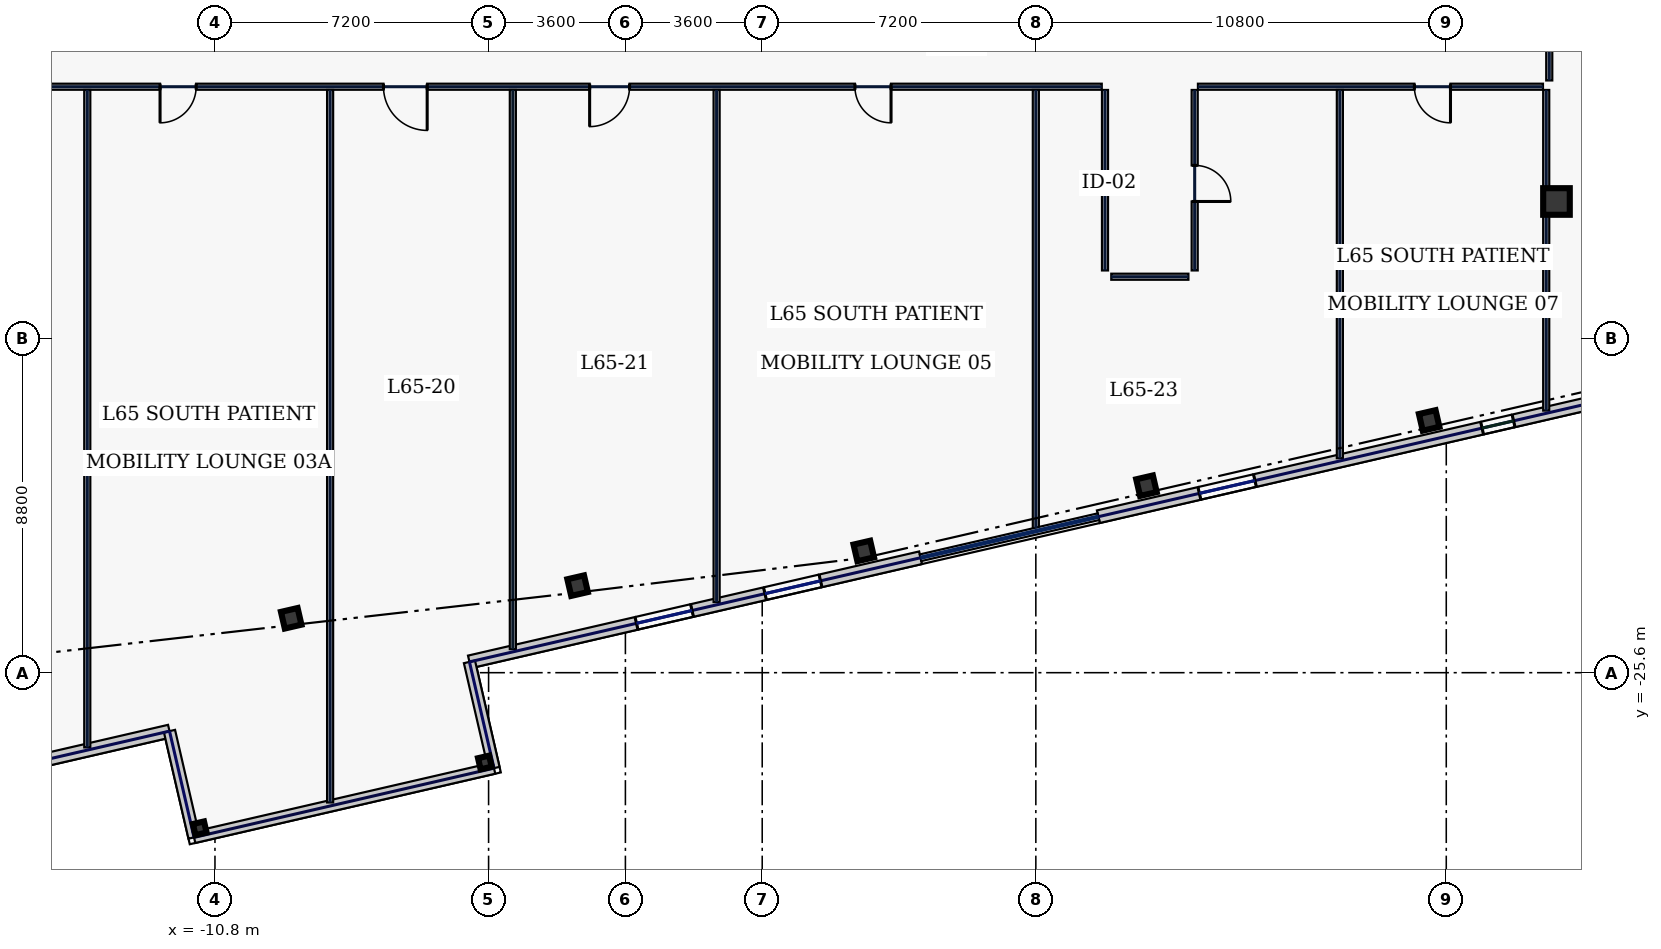
"""IFC4 building model, lengths in metres.
Left out: names, types, materials, properties, quantities, classifications, styles, units other than length and angle.
Written with IfcOpenShell. Run it as: python <this file> out.ifc"""

import sys

from ifc_helpers import new_model, si_unit, direction, frame, frame_2d, origin, origin_2d, place, context, subcontext, project, spatial, rectangle, hollow_rectangle, extrude, element, fill, save


model = new_model("IFC4")
c1 = context("Model", 3, precision=1e-05, world=origin(), true_north=direction((0.0, 1.0)))
c2 = subcontext(c1, "Body", "Model", "MODEL_VIEW")
j1 = project(units=[si_unit("LENGTHUNIT", "METRE"), si_unit("PLANEANGLEUNIT", "RADIAN")], contexts=[c1])
p1 = place(None, origin())
s1 = spatial("IfcSite", under=j1, at=p1, CompositionType="ELEMENT")
p2 = place(p1, origin())
s2 = spatial("IfcBuilding", under=s1, at=p2, CompositionType="ELEMENT")
p3 = place(p2, frame((0.0, 0.0, 281.0)))
s3 = spatial("IfcBuildingStorey", under=s2, at=p3, CompositionType="ELEMENT", Elevation=281.0)
p4 = place(p3, frame((24.5, -13.2, 0.0), z_axis=(0.0, 0.0, 1.0), x_axis=(1.0, 0.0, 0.0)))
e1 = element("IfcColumn", 1, at=p4, inside=s3, PredefinedType="COLUMN", context=c2, shape_type="SweptSolid", body=[
    extrude(hollow_rectangle(XDim=0.7, YDim=0.7, WallThickness=0.032, at=origin_2d()), origin(), (0.0, 0.0, 1.0), 3.74),
])
for number, where, z_axis, x_axis in (
    (2, (-8.794, -24.168, 0.0), (0.0, 0.0, 1.0), (0.974, 0.225, 0.0)),
    (3, (-1.258, -23.31, 0.0), (0.0, 0.0, 1.0), (0.974, 0.225, 0.0)),
    (4, (6.273, -22.397, 0.0), (0.0, 0.0, 1.0), (0.974, 0.225, 0.0)),
    (5, (13.711, -20.68, 0.0), (0.0, 0.0, 1.0), (0.974, 0.225, 0.0)),
    (6, (21.15, -18.962, 0.0), (0.0, 0.0, 1.0), (0.974, 0.225, 0.0)),
):
    element("IfcColumn", number, at=place(p3, frame(where, z_axis=z_axis, x_axis=x_axis)), inside=s3, PredefinedType="COLUMN", context=c2, shape_type="SweptSolid", body=[
        extrude(hollow_rectangle(XDim=0.45, YDim=0.45, WallThickness=0.022, at=origin_2d()), origin(), (0.0, 0.0, 1.0), 3.74),
    ])
for number, where, z_axis, x_axis in (
    (7, (-11.201, -29.695, 0.0), (0.0, 0.0, 1.0), (0.974, 0.225, 0.0)),
    (8, (-3.698, -27.963, 0.0), (0.0, 0.0, 1.0), (0.974, 0.225, 0.0)),
):
    element("IfcColumn", number, at=place(p3, frame(where, z_axis=z_axis, x_axis=x_axis)), inside=s3, PredefinedType="COLUMN", context=c2, shape_type="SweptSolid", body=[
        extrude(hollow_rectangle(XDim=0.3, YDim=0.3, WallThickness=0.016, at=origin_2d()), origin(), (0.0, 0.0, 1.0), 3.74),
    ])
p5 = place(p3, frame((-24.03, -29.916, 0.0), z_axis=(0.0, 0.0, 1.0), x_axis=(0.974371201193, 0.224946131964, 0.0)))
e9 = element("IfcWall", 9, at=p5, inside=s3, PredefinedType="STANDARD", context=c2, shape_type="SweptSolid", body=[
    extrude(rectangle(XDim=12.35, YDim=0.34, at=frame_2d((6.175, 0.0))), origin(), (0.0, 0.0, 1.0), 3.74),
])
p6 = place(p5, frame((2.35, 0.0, 0.9)))
e10 = element("IfcOpeningElement", 10, at=p6, cuts=e9, PredefinedType="OPENING", context=c2, shape_type="SweptSolid", body=[
    extrude(rectangle(XDim=1.5, YDim=2.0, at=frame_2d((0.75, 1.0))), frame((0.0, 0.18, 0.0), z_axis=(0.0, -1.0, 0.0), x_axis=(1.0, 0.0, 0.0)), (0.0, 0.0, 1.0), 0.36),
])
p7 = place(p5, frame((5.817, 0.0, 0.9)))
e11 = element("IfcOpeningElement", 11, at=p7, cuts=e9, PredefinedType="OPENING", context=c2, shape_type="SweptSolid", body=[
    extrude(rectangle(XDim=1.5, YDim=2.0, at=frame_2d((0.75, 1.0))), frame((0.0, 0.18, 0.0), z_axis=(0.0, -1.0, 0.0), x_axis=(1.0, 0.0, 0.0)), (0.0, 0.0, 1.0), 0.36),
])
p8 = place(p3, frame((-4.104, -25.316, 0.0), z_axis=(0.0, 0.0, 1.0), x_axis=(0.974372956312, 0.224938529398, 0.0)))
e12 = element("IfcWall", 12, at=p8, inside=s3, PredefinedType="STANDARD", context=c2, shape_type="SweptSolid", body=[
    extrude(rectangle(XDim=12.184, YDim=0.34, at=frame_2d((6.092, 0.0))), origin(), (0.0, 0.0, 1.0), 3.74),
])
p9 = place(p8, frame((4.511, 0.0, 0.9)))
e13 = element("IfcOpeningElement", 13, at=p9, cuts=e12, PredefinedType="OPENING", context=c2, shape_type="SweptSolid", body=[
    extrude(rectangle(XDim=1.5, YDim=2.0, at=frame_2d((0.75, 1.0))), frame((0.0, 0.18, 0.0), z_axis=(0.0, -1.0, 0.0), x_axis=(1.0, 0.0, 0.0)), (0.0, 0.0, 1.0), 0.36),
])
p10 = place(p8, frame((7.981, 0.0, 0.9)))
e14 = element("IfcOpeningElement", 14, at=p10, cuts=e12, PredefinedType="OPENING", context=c2, shape_type="SweptSolid", body=[
    extrude(rectangle(XDim=1.5, YDim=2.0, at=frame_2d((0.75, 1.0))), frame((0.0, 0.18, 0.0), z_axis=(0.0, -1.0, 0.0), x_axis=(1.0, 0.0, 0.0)), (0.0, 0.0, 1.0), 0.36),
])
p11 = place(p3, frame((12.445, -21.495, 0.0), z_axis=(0.0, 0.0, 1.0), x_axis=(0.974369392164, 0.224953967767, 0.0)))
e15 = element("IfcWall", 15, at=p11, inside=s3, PredefinedType="STANDARD", context=c2, shape_type="SweptSolid", body=[
    extrude(rectangle(XDim=17.366, YDim=0.34, at=frame_2d((8.683, 0.0))), origin(), (0.0, 0.0, 1.0), 3.74),
])
p12 = place(p11, frame((2.729, 0.0, 0.9)))
e16 = element("IfcOpeningElement", 16, at=p12, cuts=e15, PredefinedType="OPENING", context=c2, shape_type="SweptSolid", body=[
    extrude(rectangle(XDim=1.5, YDim=2.0, at=frame_2d((0.75, 1.0))), frame((0.0, 0.18, 0.0), z_axis=(0.0, -1.0, 0.0), x_axis=(1.0, 0.0, 0.0)), (0.0, 0.0, 1.0), 0.36),
])
p13 = place(p11, frame((10.363, 0.0, 0.9)))
e17 = element("IfcOpeningElement", 17, at=p13, cuts=e15, PredefinedType="OPENING", context=c2, shape_type="SweptSolid", body=[
    extrude(rectangle(XDim=0.85, YDim=1.85, at=frame_2d((0.425, 0.925))), frame((0.0, 0.18, 0.0), z_axis=(0.0, -1.0, 0.0), x_axis=(1.0, 0.0, 0.0)), (0.0, 0.0, 1.0), 0.36),
])
p14 = place(p11, frame((13.875, 0.0, 0.9)))
e18 = element("IfcOpeningElement", 18, at=p14, cuts=e15, PredefinedType="OPENING", context=c2, shape_type="SweptSolid", body=[
    extrude(rectangle(XDim=1.5, YDim=2.0, at=frame_2d((0.75, 1.0))), frame((0.0, 0.18, 0.0), z_axis=(0.0, -1.0, 0.0), x_axis=(1.0, 0.0, 0.0)), (0.0, 0.0, 1.0), 0.36),
])
p15 = place(p3, frame((32.686, -12.276, 0.0), z_axis=(0.0, 0.0, 1.0), x_axis=(-0.224953091034, 0.974369594576, 0.0)))
e19 = element("IfcWall", 19, at=p15, inside=s3, PredefinedType="STANDARD", context=c2, shape_type="SweptSolid", body=[
    extrude(rectangle(XDim=36.2, YDim=0.34, at=frame_2d((18.1, 0.0))), origin(), (0.0, 0.0, 1.0), 3.74),
])
p16 = place(p15, frame((3.725, 0.0, 0.58)))
e20 = element("IfcOpeningElement", 20, at=p16, cuts=e19, PredefinedType="OPENING", context=c2, shape_type="SweptSolid", body=[
    extrude(rectangle(XDim=1.6, YDim=2.3, at=frame_2d((0.8, 1.15))), frame((0.0, 0.18, 0.0), z_axis=(0.0, -1.0, 0.0), x_axis=(1.0, 0.0, 0.0)), (0.0, 0.0, 1.0), 0.36),
])
p17 = place(p15, frame((12.775, 0.0, 0.58)))
e21 = element("IfcOpeningElement", 21, at=p17, cuts=e19, PredefinedType="OPENING", context=c2, shape_type="SweptSolid", body=[
    extrude(rectangle(XDim=1.6, YDim=2.3, at=frame_2d((0.8, 1.15))), frame((0.0, 0.18, 0.0), z_axis=(0.0, -1.0, 0.0), x_axis=(1.0, 0.0, 0.0)), (0.0, 0.0, 1.0), 0.36),
])
p18 = place(p15, frame((21.825, 0.0, 0.58)))
e22 = element("IfcOpeningElement", 22, at=p18, cuts=e19, PredefinedType="OPENING", context=c2, shape_type="SweptSolid", body=[
    extrude(rectangle(XDim=1.6, YDim=2.3, at=frame_2d((0.8, 1.15))), frame((0.0, 0.18, 0.0), z_axis=(0.0, -1.0, 0.0), x_axis=(1.0, 0.0, 0.0)), (0.0, 0.0, 1.0), 0.36),
])
p19 = place(p15, frame((30.875, 0.0, 0.22)))
e23 = element("IfcOpeningElement", 23, at=p19, cuts=e19, PredefinedType="OPENING", context=c2, shape_type="SweptSolid", body=[
    extrude(rectangle(XDim=1.6, YDim=1.2, at=frame_2d((0.8, 0.6))), frame((0.0, 0.18, 0.0), z_axis=(0.0, -1.0, 0.0), x_axis=(1.0, 0.0, 0.0)), (0.0, 0.0, 1.0), 0.36),
])
for number, where, z_axis, x_axis in (
    (24, (-11.996, -27.138, 0.0), (0.0, 0.0, 1.0), (0.225, -0.974, 0.0)),
    (25, (-4.104, -25.316, 0.0), (0.0, 0.0, 1.0), (0.225, -0.974, 0.0)),
):
    element("IfcWall", number, at=place(p3, frame(where, z_axis=z_axis, x_axis=x_axis)), inside=s3, PredefinedType="STANDARD", context=c2, shape_type="SweptSolid", body=[
        extrude(rectangle(XDim=2.87, YDim=0.3, at=frame_2d((1.435, 0.0))), origin(), (0.0, 0.0, 1.0), 1.535),
    ])
p20 = place(p3, frame((-11.351, -29.935, 0.0), z_axis=(0.0, 0.0, 1.0), x_axis=(0.974366807022, 0.224965164799, 0.0)))
e26 = element("IfcWall", 26, at=p20, inside=s3, PredefinedType="STANDARD", context=c2, shape_type="SweptSolid", body=[
    extrude(rectangle(XDim=8.1, YDim=0.3, at=frame_2d((4.05, 0.0))), origin(), (0.0, 0.0, 1.0), 2.135),
])
p21 = place(p3, frame((24.31, 10.115, 0.0), z_axis=(0.0, 0.0, 1.0), x_axis=(0.0, -1.0, 0.0)))
e27 = element("IfcWall", 27, at=p21, inside=s3, PredefinedType="PARTITIONING", context=c2, shape_type="SweptSolid", body=[
    extrude(rectangle(XDim=20.13, YDim=0.16, at=frame_2d((10.065, 0.0))), origin(), (0.0, 0.0, 1.0), 3.74),
])
p22 = place(p21, frame((16.526, 0.0, 0.0)))
e28 = element("IfcOpeningElement", 28, at=p22, cuts=e27, PredefinedType="OPENING", context=c2, shape_type="SweptSolid", body=[
    extrude(rectangle(XDim=0.95, YDim=2.2, at=frame_2d((0.475, 1.1))), frame((0.0, 0.09, 0.0), z_axis=(0.0, -1.0, 0.0), x_axis=(1.0, 0.0, 0.0)), (0.0, 0.0, 1.0), 0.18),
])
p23 = place(p21, frame((5.444, 0.0, 0.0)))
e29 = element("IfcOpeningElement", 29, at=p23, cuts=e27, PredefinedType="OPENING", context=c2, shape_type="SweptSolid", body=[
    extrude(rectangle(XDim=0.95, YDim=2.2, at=frame_2d((0.475, 1.1))), frame((0.0, 0.09, 0.0), z_axis=(0.0, -1.0, 0.0), x_axis=(1.0, 0.0, 0.0)), (0.0, 0.0, 1.0), 0.18),
])
p24 = place(p3, frame((24.145, -10.18, 0.0), z_axis=(0.0, 0.0, 1.0), x_axis=(-1.0, 0.0, 0.0)))
e30 = element("IfcWall", 30, at=p24, inside=s3, PredefinedType="PARTITIONING", context=c2, shape_type="SweptSolid", body=[
    extrude(rectangle(XDim=9.08, YDim=0.16, at=frame_2d((4.54, 0.0))), origin(), (0.0, 0.0, 1.0), 3.74),
])
p25 = place(p24, frame((2.434, 0.0, 0.0)))
e31 = element("IfcOpeningElement", 31, at=p25, cuts=e30, PredefinedType="OPENING", context=c2, shape_type="SweptSolid", body=[
    extrude(rectangle(XDim=0.95, YDim=2.2, at=frame_2d((0.475, 1.1))), frame((0.0, 0.09, 0.0), z_axis=(0.0, -1.0, 0.0), x_axis=(1.0, 0.0, 0.0)), (0.0, 0.0, 1.0), 0.18),
])
p26 = place(p3, frame((14.98, -10.265, 0.0), z_axis=(0.0, 0.0, 1.0), x_axis=(0.0, -1.0, 0.0)))
e32 = element("IfcWall", 32, at=p26, inside=s3, PredefinedType="PARTITIONING", context=c2, shape_type="SweptSolid", body=[
    extrude(rectangle(XDim=4.75, YDim=0.16, at=frame_2d((2.375, 0.0))), origin(), (0.0, 0.0, 1.0), 3.74),
])
p27 = place(p26, frame((1.985, 0.0, 0.0)))
e33 = element("IfcOpeningElement", 33, at=p27, cuts=e32, PredefinedType="OPENING", context=c2, shape_type="SweptSolid", body=[
    extrude(rectangle(XDim=0.95, YDim=2.2, at=frame_2d((0.475, 1.1))), frame((0.0, 0.09, 0.0), z_axis=(0.0, -1.0, 0.0), x_axis=(1.0, 0.0, 0.0)), (0.0, 0.0, 1.0), 0.18),
])
p28 = place(p3, frame((14.815, -15.18, 0.0), z_axis=(0.0, 0.0, 1.0), x_axis=(-1.0, 0.0, 0.0)))
e34 = element("IfcWall", 34, at=p28, inside=s3, PredefinedType="PARTITIONING", context=c2, shape_type="SweptSolid", body=[
    extrude(rectangle(XDim=2.03, YDim=0.16, at=frame_2d((1.015, 0.0))), origin(), (0.0, 0.0, 1.0), 3.74),
])
p29 = place(p3, frame((12.62, -15.015, 0.0), z_axis=(0.0, 0.0, 1.0), x_axis=(0.0, 1.0, 0.0)))
e35 = element("IfcWall", 35, at=p29, inside=s3, PredefinedType="PARTITIONING", context=c2, shape_type="SweptSolid", body=[
    extrude(rectangle(XDim=4.75, YDim=0.16, at=frame_2d((2.375, 0.0))), origin(), (0.0, 0.0, 1.0), 3.74),
])
p30 = place(p3, frame((12.535, -10.18, 0.0), z_axis=(0.0, 0.0, 1.0), x_axis=(-1.0, 0.0, 0.0)))
e36 = element("IfcWall", 36, at=p30, inside=s3, PredefinedType="PARTITIONING", context=c2, shape_type="SweptSolid", body=[
    extrude(rectangle(XDim=36.68, YDim=0.16, at=frame_2d((18.34, 0.0))), origin(), (0.0, 0.0, 1.0), 3.74),
])
p31 = place(p30, frame((33.856, 0.0, 0.0)))
e37 = element("IfcOpeningElement", 37, at=p31, cuts=e36, PredefinedType="OPENING", context=c2, shape_type="SweptSolid", body=[
    extrude(rectangle(XDim=0.95, YDim=2.2, at=frame_2d((0.475, 1.1))), frame((0.0, 0.09, 0.0), z_axis=(0.0, -1.0, 0.0), x_axis=(1.0, 0.0, 0.0)), (0.0, 0.0, 1.0), 0.18),
])
p32 = place(p30, frame((29.015, 0.0, 0.0)))
e38 = element("IfcOpeningElement", 38, at=p32, cuts=e36, PredefinedType="OPENING", context=c2, shape_type="SweptSolid", body=[
    extrude(rectangle(XDim=0.95, YDim=2.2, at=frame_2d((0.475, 1.1))), frame((0.0, 0.09, 0.0), z_axis=(0.0, -1.0, 0.0), x_axis=(1.0, 0.0, 0.0)), (0.0, 0.0, 1.0), 0.18),
])
p33 = place(p30, frame((23.83, 0.0, 0.0)))
e39 = element("IfcOpeningElement", 39, at=p33, cuts=e36, PredefinedType="OPENING", context=c2, shape_type="SweptSolid", body=[
    extrude(rectangle(XDim=0.95, YDim=2.2, at=frame_2d((0.475, 1.1))), frame((0.0, 0.09, 0.0), z_axis=(0.0, -1.0, 0.0), x_axis=(1.0, 0.0, 0.0)), (0.0, 0.0, 1.0), 0.18),
])
p34 = place(p30, frame((17.751, 0.0, 0.0)))
e40 = element("IfcOpeningElement", 40, at=p34, cuts=e36, PredefinedType="OPENING", context=c2, shape_type="SweptSolid", body=[
    extrude(rectangle(XDim=1.15, YDim=2.2, at=frame_2d((0.575, 1.1))), frame((0.0, 0.09, 0.0), z_axis=(0.0, -1.0, 0.0), x_axis=(1.0, 0.0, 0.0)), (0.0, 0.0, 1.0), 0.18),
])
p35 = place(p30, frame((12.426, 0.0, 0.0)))
e41 = element("IfcOpeningElement", 41, at=p35, cuts=e36, PredefinedType="OPENING", context=c2, shape_type="SweptSolid", body=[
    extrude(rectangle(XDim=1.05, YDim=2.2, at=frame_2d((0.525, 1.1))), frame((0.0, 0.09, 0.0), z_axis=(0.0, -1.0, 0.0), x_axis=(1.0, 0.0, 0.0)), (0.0, 0.0, 1.0), 0.18),
])
p36 = place(p30, frame((5.545, 0.0, 0.0)))
e42 = element("IfcOpeningElement", 42, at=p36, cuts=e36, PredefinedType="OPENING", context=c2, shape_type="SweptSolid", body=[
    extrude(rectangle(XDim=0.95, YDim=2.2, at=frame_2d((0.475, 1.1))), frame((0.0, 0.09, 0.0), z_axis=(0.0, -1.0, 0.0), x_axis=(1.0, 0.0, 0.0)), (0.0, 0.0, 1.0), 0.18),
])
p37 = place(p3, frame((24.23, -18.703, 0.0), z_axis=(0.0, 0.0, 1.0), x_axis=(0.0, 1.0, 0.0)))
e43 = element("IfcWall", 43, at=p37, inside=s3, PredefinedType="PARTITIONING", context=c2, shape_type="SweptSolid", body=[
    extrude(rectangle(XDim=8.438, YDim=0.16, at=frame_2d((4.219, 0.0))), origin(), (0.0, 0.0, 1.0), 3.74),
])
p38 = place(p3, frame((-14.16, -27.566, 0.0), z_axis=(0.0, 0.0, 1.0), x_axis=(0.0, 1.0, 0.0)))
e44 = element("IfcWall", 44, at=p38, inside=s3, PredefinedType="PARTITIONING", context=c2, shape_type="SweptSolid", body=[
    extrude(rectangle(XDim=17.301, YDim=0.16, at=frame_2d((8.65, 0.0))), origin(), (0.0, 0.0, 1.0), 3.74),
])
p39 = place(p3, frame((-2.962, -24.98, 0.0), z_axis=(0.0, 0.0, 1.0), x_axis=(0.0, 1.0, 0.0)))
e45 = element("IfcWall", 45, at=p39, inside=s3, PredefinedType="PARTITIONING", context=c2, shape_type="SweptSolid", body=[
    extrude(rectangle(XDim=14.716, YDim=0.16, at=frame_2d((7.358, 0.0))), origin(), (0.0, 0.0, 1.0), 2.135),
])
p40 = place(p3, frame((2.4, -23.743, 0.0), z_axis=(0.0, 0.0, 1.0), x_axis=(0.0, 1.0, 0.0)))
e46 = element("IfcWall", 46, at=p40, inside=s3, PredefinedType="PARTITIONING", context=c2, shape_type="SweptSolid", body=[
    extrude(rectangle(XDim=13.478, YDim=0.16, at=frame_2d((6.739, 0.0))), origin(), (0.0, 0.0, 1.0), 3.74),
])
p41 = place(p3, frame((10.8, -21.803, 0.0), z_axis=(0.0, 0.0, 1.0), x_axis=(0.0, 1.0, 0.0)))
e47 = element("IfcWall", 47, at=p41, inside=s3, PredefinedType="PARTITIONING", context=c2, shape_type="SweptSolid", body=[
    extrude(rectangle(XDim=11.538, YDim=0.16, at=frame_2d((5.769, 0.0))), origin(), (0.0, 0.0, 1.0), 3.74),
])
p42 = place(p3, frame((18.8, -19.956, 0.0), z_axis=(0.0, 0.0, 1.0), x_axis=(0.0, 1.0, 0.0)))
e48 = element("IfcWall", 48, at=p42, inside=s3, PredefinedType="PARTITIONING", context=c2, shape_type="SweptSolid", body=[
    extrude(rectangle(XDim=9.691, YDim=0.16, at=frame_2d((4.846, 0.0))), origin(), (0.0, 0.0, 1.0), 3.74),
])
p43 = place(p3, frame((-7.77, -29.015, 0.0), z_axis=(0.0, 0.0, 1.0), x_axis=(0.0, 1.0, 0.0)))
e49 = element("IfcWall", 49, at=p43, inside=s3, PredefinedType="PARTITIONING", context=c2, shape_type="SweptSolid", body=[
    extrude(rectangle(XDim=18.75, YDim=0.16, at=frame_2d((9.375, 0.0))), origin(), (0.0, 0.0, 1.0), 3.74),
])
p44 = place(p9, origin())
e50 = element("IfcWindow", 50, at=p44, inside=s3, PartitioningType="SINGLE_PANEL", PredefinedType="WINDOW", context=c2, shape_type="SweptSolid", body=[
    extrude(rectangle(XDim=1.5, YDim=2.0, at=frame_2d((0.75, 1.0))), frame((0.0, 0.03, 0.0), z_axis=(0.0, -1.0, 0.0), x_axis=(1.0, 0.0, 0.0)), (0.0, 0.0, 1.0), 0.06),
])
fill(e13, e50)
p45 = place(p10, origin())
e51 = element("IfcWindow", 51, at=p45, inside=s3, PartitioningType="SINGLE_PANEL", PredefinedType="WINDOW", context=c2, shape_type="SweptSolid", body=[
    extrude(rectangle(XDim=1.5, YDim=2.0, at=frame_2d((0.75, 1.0))), frame((0.0, 0.03, 0.0), z_axis=(0.0, -1.0, 0.0), x_axis=(1.0, 0.0, 0.0)), (0.0, 0.0, 1.0), 0.06),
])
fill(e14, e51)
p46 = place(p12, origin())
e52 = element("IfcWindow", 52, at=p46, inside=s3, PartitioningType="SINGLE_PANEL", PredefinedType="WINDOW", context=c2, shape_type="SweptSolid", body=[
    extrude(rectangle(XDim=1.5, YDim=2.0, at=frame_2d((0.75, 1.0))), frame((0.0, 0.03, 0.0), z_axis=(0.0, -1.0, 0.0), x_axis=(1.0, 0.0, 0.0)), (0.0, 0.0, 1.0), 0.06),
])
fill(e16, e52)
p47 = place(p13, origin())
e53 = element("IfcWindow", 53, at=p47, inside=s3, PartitioningType="SINGLE_PANEL", PredefinedType="WINDOW", context=c2, shape_type="SweptSolid", body=[
    extrude(rectangle(XDim=0.85, YDim=1.85, at=frame_2d((0.425, 0.925))), frame((0.0, 0.03, 0.0), z_axis=(0.0, -1.0, 0.0), x_axis=(1.0, 0.0, 0.0)), (0.0, 0.0, 1.0), 0.06),
])
fill(e17, e53)
p48 = place(p33, origin())
e54 = element("IfcDoor", 54, at=p48, inside=s3, OperationType="SINGLE_SWING_RIGHT", PredefinedType="DOOR", context=c2, shape_type="SweptSolid", body=[
    extrude(rectangle(XDim=0.95, YDim=2.2, at=frame_2d((0.475, 1.1))), frame((0.0, 0.025, 0.0), z_axis=(0.0, -1.0, 0.0), x_axis=(1.0, 0.0, 0.0)), (0.0, 0.0, 1.0), 0.05),
])
fill(e39, e54)
p49 = place(p34, origin())
e55 = element("IfcDoor", 55, at=p49, inside=s3, OperationType="SINGLE_SWING_LEFT", PredefinedType="DOOR", context=c2, shape_type="SweptSolid", body=[
    extrude(rectangle(XDim=1.15, YDim=2.2, at=frame_2d((0.575, 1.1))), frame((0.0, 0.025, 0.0), z_axis=(0.0, -1.0, 0.0), x_axis=(1.0, 0.0, 0.0)), (0.0, 0.0, 1.0), 0.05),
])
fill(e40, e55)
p50 = place(p35, origin())
e56 = element("IfcDoor", 56, at=p50, inside=s3, OperationType="SINGLE_SWING_RIGHT", PredefinedType="DOOR", context=c2, shape_type="SweptSolid", body=[
    extrude(rectangle(XDim=1.05, YDim=2.2, at=frame_2d((0.525, 1.1))), frame((0.0, 0.025, 0.0), z_axis=(0.0, -1.0, 0.0), x_axis=(1.0, 0.0, 0.0)), (0.0, 0.0, 1.0), 0.05),
])
fill(e41, e56)
p51 = place(p36, origin())
e57 = element("IfcDoor", 57, at=p51, inside=s3, OperationType="SINGLE_SWING_LEFT", PredefinedType="DOOR", context=c2, shape_type="SweptSolid", body=[
    extrude(rectangle(XDim=0.95, YDim=2.2, at=frame_2d((0.475, 1.1))), frame((0.0, 0.025, 0.0), z_axis=(0.0, -1.0, 0.0), x_axis=(1.0, 0.0, 0.0)), (0.0, 0.0, 1.0), 0.05),
])
fill(e42, e57)
p52 = place(p27, origin())
e58 = element("IfcDoor", 58, at=p52, inside=s3, OperationType="SINGLE_SWING_RIGHT", PredefinedType="DOOR", context=c2, shape_type="SweptSolid", body=[
    extrude(rectangle(XDim=0.95, YDim=2.2, at=frame_2d((0.475, 1.1))), frame((0.0, 0.025, 0.0), z_axis=(0.0, -1.0, 0.0), x_axis=(1.0, 0.0, 0.0)), (0.0, 0.0, 1.0), 0.05),
])
fill(e33, e58)
p53 = place(p25, origin())
e59 = element("IfcDoor", 59, at=p53, inside=s3, OperationType="SINGLE_SWING_LEFT", PredefinedType="DOOR", context=c2, shape_type="SweptSolid", body=[
    extrude(rectangle(XDim=0.95, YDim=2.2, at=frame_2d((0.475, 1.1))), frame((0.0, 0.025, 0.0), z_axis=(0.0, -1.0, 0.0), x_axis=(1.0, 0.0, 0.0)), (0.0, 0.0, 1.0), 0.05),
])
fill(e31, e59)
save(model, sys.argv[1])
